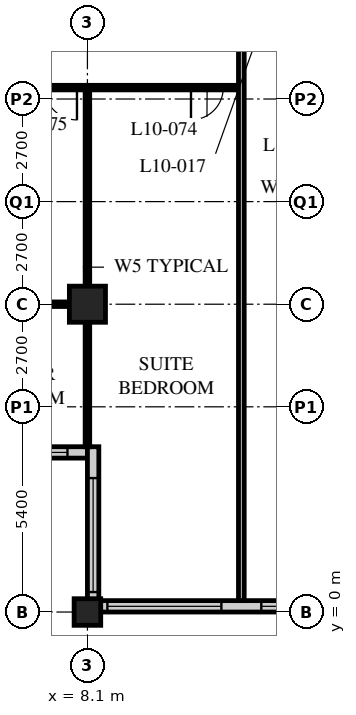
"""IFC4 building model, lengths in metres.
Left out: names, types, materials, properties, quantities, classifications, styles, units other than length and angle.
Written with IfcOpenShell. Run it as: python <this file> out.ifc"""

import sys

from ifc_helpers import new_model, si_unit, direction, frame, frame_2d, origin, origin_2d, place, context, subcontext, project, spatial, rectangle, hollow_rectangle, extrude, element, fill, save


model = new_model("IFC4")
c1 = context("Model", 3, precision=1e-05, world=origin(), true_north=direction((0.0, 1.0)))
c2 = subcontext(c1, "Body", "Model", "MODEL_VIEW")
j1 = project(units=[si_unit("LENGTHUNIT", "METRE"), si_unit("PLANEANGLEUNIT", "RADIAN")], contexts=[c1])
p1 = place(None, origin())
s1 = spatial("IfcSite", under=j1, at=p1, CompositionType="ELEMENT")
p2 = place(p1, origin())
s2 = spatial("IfcBuilding", under=s1, at=p2, CompositionType="ELEMENT")
p3 = place(p2, frame((0.0, 0.0, 46.6)))
s3 = spatial("IfcBuildingStorey", under=s2, at=p3, CompositionType="ELEMENT", Elevation=46.6)
p4 = place(p3, frame((8.1, 0.0, 0.0), z_axis=(0.0, 0.0, 1.0), x_axis=(1.0, 0.0, 0.0)))
e1 = element("IfcColumn", 1, at=p4, inside=s3, PredefinedType="COLUMN", context=c2, shape_type="SweptSolid", body=[
    extrude(hollow_rectangle(XDim=0.7, YDim=0.7, WallThickness=0.06, at=origin_2d()), origin(), (0.0, 0.0, 1.0), 3.4),
])
p5 = place(p3, frame((8.1, 8.1, 0.0), z_axis=(0.0, 0.0, 1.0), x_axis=(1.0, 0.0, 0.0)))
e2 = element("IfcColumn", 2, at=p5, inside=s3, PredefinedType="COLUMN", context=c2, shape_type="SweptSolid", body=[
    extrude(hollow_rectangle(XDim=0.95, YDim=0.95, WallThickness=0.095, at=origin_2d()), origin(), (0.0, 0.0, 1.0), 3.4),
])
p6 = place(p3, frame((8.4, 0.15, 0.0), z_axis=(0.0, 0.0, 1.0), x_axis=(1.0, 0.0, 0.0)))
e3 = element("IfcWall", 3, at=p6, inside=s3, PredefinedType="SOLIDWALL", context=c2, shape_type="SweptSolid", body=[
    extrude(rectangle(XDim=40.2, YDim=0.3, at=frame_2d((20.1, 0.0))), origin(), (0.0, 0.0, 1.0), 3.19),
])
p7 = place(p6, frame((0.225, 0.0, 0.9)))
e4 = element("IfcOpeningElement", 4, at=p7, cuts=e3, PredefinedType="OPENING", context=c2, shape_type="SweptSolid", body=[
    extrude(rectangle(XDim=3.0, YDim=2.0, at=frame_2d((1.5, 1.0))), frame((0.0, 0.16, 0.0), z_axis=(0.0, -1.0, 0.0), x_axis=(1.0, 0.0, 0.0)), (0.0, 0.0, 1.0), 0.32),
])
p8 = place(p6, frame((4.275, 0.0, 0.9)))
e5 = element("IfcOpeningElement", 5, at=p8, cuts=e3, PredefinedType="OPENING", context=c2, shape_type="SweptSolid", body=[
    extrude(rectangle(XDim=3.0, YDim=2.0, at=frame_2d((1.5, 1.0))), frame((0.0, 0.16, 0.0), z_axis=(0.0, -1.0, 0.0), x_axis=(1.0, 0.0, 0.0)), (0.0, 0.0, 1.0), 0.32),
])
p9 = place(p6, frame((8.325, 0.0, 0.9)))
e6 = element("IfcOpeningElement", 6, at=p9, cuts=e3, PredefinedType="OPENING", context=c2, shape_type="SweptSolid", body=[
    extrude(rectangle(XDim=3.0, YDim=2.0, at=frame_2d((1.5, 1.0))), frame((0.0, 0.16, 0.0), z_axis=(0.0, -1.0, 0.0), x_axis=(1.0, 0.0, 0.0)), (0.0, 0.0, 1.0), 0.32),
])
p10 = place(p6, frame((12.375, 0.0, 0.9)))
e7 = element("IfcOpeningElement", 7, at=p10, cuts=e3, PredefinedType="OPENING", context=c2, shape_type="SweptSolid", body=[
    extrude(rectangle(XDim=3.0, YDim=2.0, at=frame_2d((1.5, 1.0))), frame((0.0, 0.16, 0.0), z_axis=(0.0, -1.0, 0.0), x_axis=(1.0, 0.0, 0.0)), (0.0, 0.0, 1.0), 0.32),
])
p11 = place(p6, frame((16.425, 0.0, 0.9)))
e8 = element("IfcOpeningElement", 8, at=p11, cuts=e3, PredefinedType="OPENING", context=c2, shape_type="SweptSolid", body=[
    extrude(rectangle(XDim=3.0, YDim=2.0, at=frame_2d((1.5, 1.0))), frame((0.0, 0.16, 0.0), z_axis=(0.0, -1.0, 0.0), x_axis=(1.0, 0.0, 0.0)), (0.0, 0.0, 1.0), 0.32),
])
p12 = place(p6, frame((20.475, 0.0, 0.9)))
e9 = element("IfcOpeningElement", 9, at=p12, cuts=e3, PredefinedType="OPENING", context=c2, shape_type="SweptSolid", body=[
    extrude(rectangle(XDim=3.0, YDim=2.0, at=frame_2d((1.5, 1.0))), frame((0.0, 0.16, 0.0), z_axis=(0.0, -1.0, 0.0), x_axis=(1.0, 0.0, 0.0)), (0.0, 0.0, 1.0), 0.32),
])
p13 = place(p6, frame((24.525, 0.0, 0.9)))
e10 = element("IfcOpeningElement", 10, at=p13, cuts=e3, PredefinedType="OPENING", context=c2, shape_type="SweptSolid", body=[
    extrude(rectangle(XDim=3.0, YDim=2.0, at=frame_2d((1.5, 1.0))), frame((0.0, 0.16, 0.0), z_axis=(0.0, -1.0, 0.0), x_axis=(1.0, 0.0, 0.0)), (0.0, 0.0, 1.0), 0.32),
])
p14 = place(p6, frame((28.575, 0.0, 0.9)))
e11 = element("IfcOpeningElement", 11, at=p14, cuts=e3, PredefinedType="OPENING", context=c2, shape_type="SweptSolid", body=[
    extrude(rectangle(XDim=3.0, YDim=2.0, at=frame_2d((1.5, 1.0))), frame((0.0, 0.16, 0.0), z_axis=(0.0, -1.0, 0.0), x_axis=(1.0, 0.0, 0.0)), (0.0, 0.0, 1.0), 0.32),
])
p15 = place(p6, frame((32.625, 0.0, 0.9)))
e12 = element("IfcOpeningElement", 12, at=p15, cuts=e3, PredefinedType="OPENING", context=c2, shape_type="SweptSolid", body=[
    extrude(rectangle(XDim=3.0, YDim=2.0, at=frame_2d((1.5, 1.0))), frame((0.0, 0.16, 0.0), z_axis=(0.0, -1.0, 0.0), x_axis=(1.0, 0.0, 0.0)), (0.0, 0.0, 1.0), 0.32),
])
p16 = place(p6, frame((36.675, 0.0, 0.9)))
e13 = element("IfcOpeningElement", 13, at=p16, cuts=e3, PredefinedType="OPENING", context=c2, shape_type="SweptSolid", body=[
    extrude(rectangle(XDim=3.0, YDim=2.0, at=frame_2d((1.5, 1.0))), frame((0.0, 0.16, 0.0), z_axis=(0.0, -1.0, 0.0), x_axis=(1.0, 0.0, 0.0)), (0.0, 0.0, 1.0), 0.32),
])
p17 = place(p3, frame((4.35, 4.2, 0.0), z_axis=(0.0, 0.0, 1.0), x_axis=(1.0, 0.0, 0.0)))
e14 = element("IfcWall", 14, at=p17, inside=s3, PredefinedType="SOLIDWALL", context=c2, shape_type="SweptSolid", body=[
    extrude(rectangle(XDim=3.75, YDim=0.3, at=frame_2d((1.875, 0.0))), origin(), (0.0, 0.0, 1.0), 3.19),
])
p18 = place(p17, frame((0.225, 0.0, 0.9)))
e15 = element("IfcOpeningElement", 15, at=p18, cuts=e14, PredefinedType="OPENING", context=c2, shape_type="SweptSolid", body=[
    extrude(rectangle(XDim=3.0, YDim=1.5, at=frame_2d((1.5, 0.75))), frame((0.0, 0.16, 0.0), z_axis=(0.0, -1.0, 0.0), x_axis=(1.0, 0.0, 0.0)), (0.0, 0.0, 1.0), 0.32),
])
p19 = place(p3, frame((8.25, 4.35, 0.0), z_axis=(0.0, 0.0, 1.0), x_axis=(0.0, -1.0, 0.0)))
e16 = element("IfcWall", 16, at=p19, inside=s3, PredefinedType="SOLIDWALL", context=c2, shape_type="SweptSolid", body=[
    extrude(rectangle(XDim=4.35, YDim=0.3, at=frame_2d((2.175, 0.0))), origin(), (0.0, 0.0, 1.0), 3.19),
])
p20 = place(p19, frame((0.825, 0.0, 0.9)))
e17 = element("IfcOpeningElement", 17, at=p20, cuts=e16, PredefinedType="OPENING", context=c2, shape_type="SweptSolid", body=[
    extrude(rectangle(XDim=3.0, YDim=1.5, at=frame_2d((1.5, 0.75))), frame((0.0, 0.16, 0.0), z_axis=(0.0, -1.0, 0.0), x_axis=(1.0, 0.0, 0.0)), (0.0, 0.0, 1.0), 0.32),
])
p21 = place(p3, frame((4.1, 13.8, 0.0), z_axis=(0.0, 0.0, 1.0), x_axis=(1.0, 0.0, 0.0)))
e18 = element("IfcWall", 18, at=p21, inside=s3, PredefinedType="PARTITIONING", context=c2, shape_type="SweptSolid", body=[
    extrude(rectangle(XDim=8.05, YDim=0.12, at=frame_2d((4.025, 0.0))), origin(), (0.0, 0.0, 1.0), 3.19),
])
p22 = place(p21, frame((6.725, 0.0, 0.0)))
e19 = element("IfcOpeningElement", 19, at=p22, cuts=e18, PredefinedType="OPENING", context=c2, shape_type="SweptSolid", body=[
    extrude(rectangle(XDim=0.85, YDim=2.1, at=frame_2d((0.425, 1.05))), frame((0.0, 0.07, 0.0), z_axis=(0.0, -1.0, 0.0), x_axis=(1.0, 0.0, 0.0)), (0.0, 0.0, 1.0), 0.14),
])
p23 = place(p21, frame((2.875, 0.0, 0.0)))
e20 = element("IfcOpeningElement", 20, at=p23, cuts=e18, PredefinedType="OPENING", context=c2, shape_type="SweptSolid", body=[
    extrude(rectangle(XDim=0.85, YDim=2.1, at=frame_2d((0.425, 1.05))), frame((0.0, 0.07, 0.0), z_axis=(0.0, -1.0, 0.0), x_axis=(1.0, 0.0, 0.0)), (0.0, 0.0, 1.0), 0.14),
])
p24 = place(p3, frame((8.1, 13.8, 0.0), z_axis=(0.0, 0.0, 1.0), x_axis=(0.0, -1.0, 0.0)))
e21 = element("IfcWall", 21, at=p24, inside=s3, PredefinedType="PARTITIONING", context=c2, shape_type="SweptSolid", body=[
    extrude(rectangle(XDim=9.45, YDim=0.12, at=frame_2d((4.725, 0.0))), origin(), (0.0, 0.0, 1.0), 2.578),
])
p25 = place(p3, frame((8.1, 8.1, 0.0), z_axis=(0.0, 0.0, 1.0), x_axis=(-1.0, 0.0, 0.0)))
e22 = element("IfcWall", 22, at=p25, inside=s3, PredefinedType="PARTITIONING", context=c2, shape_type="SweptSolid", body=[
    extrude(rectangle(XDim=3.75, YDim=0.12, at=frame_2d((1.875, 0.0))), origin(), (0.0, 0.0, 1.0), 2.578),
])
p26 = place(p25, frame((1.875, 0.0, 0.0)))
e23 = element("IfcOpeningElement", 23, at=p26, cuts=e22, PredefinedType="OPENING", context=c2, shape_type="SweptSolid", body=[
    extrude(rectangle(XDim=0.85, YDim=2.1, at=frame_2d((0.425, 1.05))), frame((0.0, 0.07, 0.0), z_axis=(0.0, -1.0, 0.0), x_axis=(1.0, 0.0, 0.0)), (0.0, 0.0, 1.0), 0.14),
])
p27 = place(p3, frame((12.15, 16.2, 0.0), z_axis=(0.0, 0.0, 1.0), x_axis=(0.0, -1.0, 0.0)))
e24 = element("IfcWall", 24, at=p27, inside=s3, PredefinedType="PARTITIONING", context=c2, shape_type="SweptSolid", body=[
    extrude(rectangle(XDim=15.9, YDim=0.15, at=frame_2d((7.95, 0.0))), origin(), (0.0, 0.0, 1.0), 3.19),
])
p28 = place(p7, origin())
e25 = element("IfcWindow", 25, at=p28, inside=s3, PartitioningType="SINGLE_PANEL", PredefinedType="WINDOW", context=c2, shape_type="SweptSolid", body=[
    extrude(rectangle(XDim=3.0, YDim=2.0, at=frame_2d((1.5, 1.0))), frame((0.0, 0.03, 0.0), z_axis=(0.0, -1.0, 0.0), x_axis=(1.0, 0.0, 0.0)), (0.0, 0.0, 1.0), 0.06),
])
fill(e4, e25)
p29 = place(p8, origin())
e26 = element("IfcWindow", 26, at=p29, inside=s3, PartitioningType="SINGLE_PANEL", PredefinedType="WINDOW", context=c2, shape_type="SweptSolid", body=[
    extrude(rectangle(XDim=3.0, YDim=2.0, at=frame_2d((1.5, 1.0))), frame((0.0, 0.03, 0.0), z_axis=(0.0, -1.0, 0.0), x_axis=(1.0, 0.0, 0.0)), (0.0, 0.0, 1.0), 0.06),
])
fill(e5, e26)
p30 = place(p18, origin())
e27 = element("IfcWindow", 27, at=p30, inside=s3, PartitioningType="SINGLE_PANEL", PredefinedType="WINDOW", context=c2, shape_type="SweptSolid", body=[
    extrude(rectangle(XDim=3.0, YDim=1.5, at=frame_2d((1.5, 0.75))), frame((0.0, 0.03, 0.0), z_axis=(0.0, -1.0, 0.0), x_axis=(1.0, 0.0, 0.0)), (0.0, 0.0, 1.0), 0.06),
])
fill(e15, e27)
p31 = place(p20, origin())
e28 = element("IfcWindow", 28, at=p31, inside=s3, PartitioningType="SINGLE_PANEL", PredefinedType="WINDOW", context=c2, shape_type="SweptSolid", body=[
    extrude(rectangle(XDim=3.0, YDim=1.5, at=frame_2d((1.5, 0.75))), frame((0.0, 0.03, 0.0), z_axis=(0.0, -1.0, 0.0), x_axis=(1.0, 0.0, 0.0)), (0.0, 0.0, 1.0), 0.06),
])
fill(e17, e28)
p32 = place(p22, origin())
e29 = element("IfcDoor", 29, at=p32, inside=s3, OperationType="SINGLE_SWING_RIGHT", PredefinedType="DOOR", context=c2, shape_type="SweptSolid", body=[
    extrude(rectangle(XDim=0.85, YDim=2.1, at=frame_2d((0.425, 1.05))), frame((0.0, 0.025, 0.0), z_axis=(0.0, -1.0, 0.0), x_axis=(1.0, 0.0, 0.0)), (0.0, 0.0, 1.0), 0.05),
])
fill(e19, e29)
p33 = place(p23, origin())
e30 = element("IfcDoor", 30, at=p33, inside=s3, OperationType="SINGLE_SWING_LEFT", PredefinedType="DOOR", context=c2, shape_type="SweptSolid", body=[
    extrude(rectangle(XDim=0.85, YDim=2.1, at=frame_2d((0.425, 1.05))), frame((0.0, 0.025, 0.0), z_axis=(0.0, -1.0, 0.0), x_axis=(1.0, 0.0, 0.0)), (0.0, 0.0, 1.0), 0.05),
])
fill(e20, e30)
save(model, sys.argv[1])
